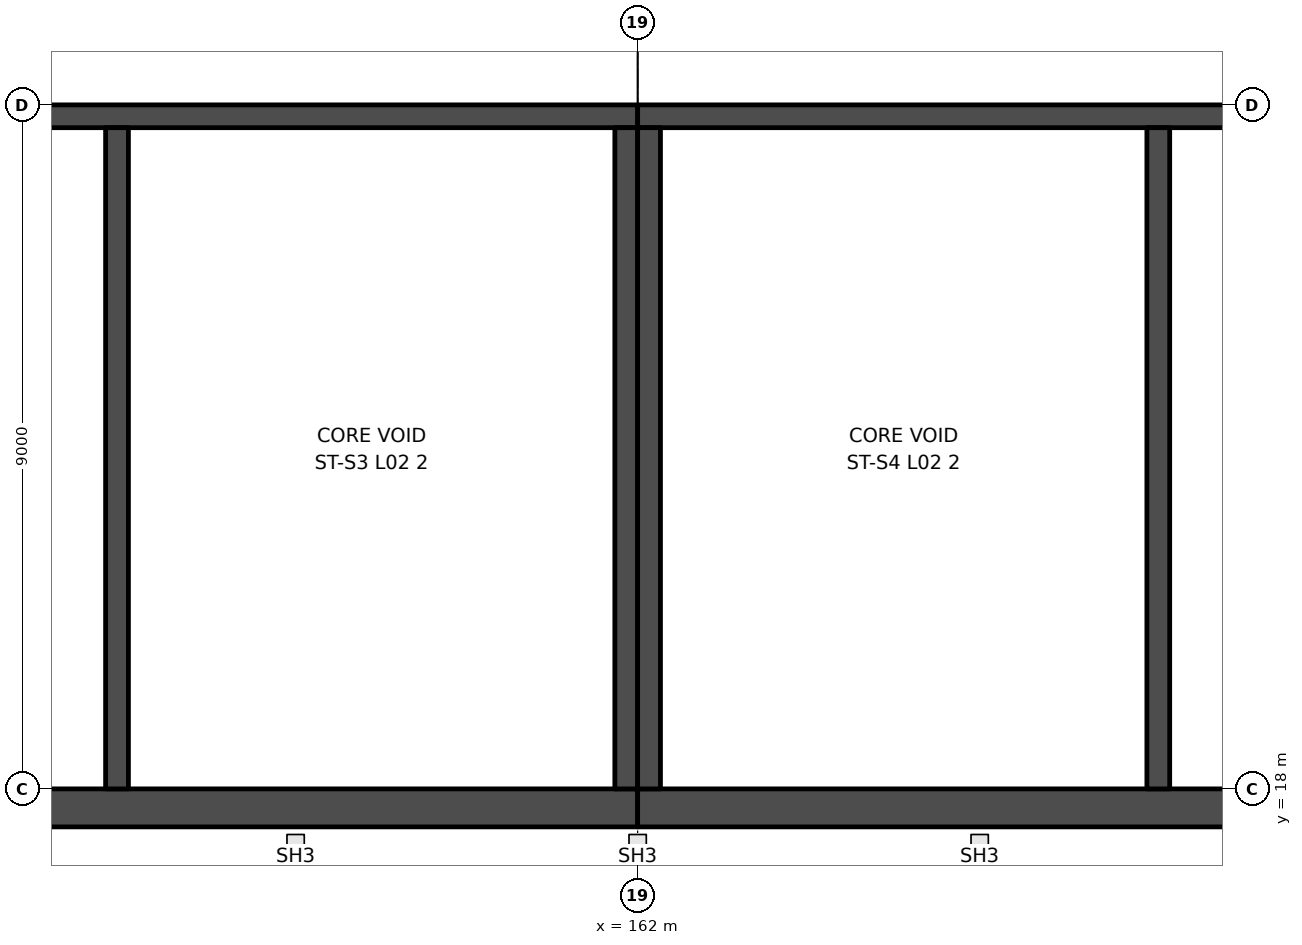
"""IFC4 building model, lengths in metres.
Left out: names, types, materials, properties, quantities, classifications, styles, units other than length and angle.
Written with IfcOpenShell. Run it as: python <this file> out.ifc"""

import sys

from ifc_helpers import new_model, si_unit, direction, frame, frame_2d, origin, place, context, subcontext, project, spatial, rectangle, extrude, element, save


model = new_model("IFC4")
c1 = context("Model", 3, precision=1e-05, world=origin(), true_north=direction((0.0, 1.0)))
c2 = subcontext(c1, "Body", "Model", "MODEL_VIEW")
j1 = project(units=[si_unit("LENGTHUNIT", "METRE"), si_unit("PLANEANGLEUNIT", "RADIAN")], contexts=[c1])
p1 = place(None, origin())
s1 = spatial("IfcSite", under=j1, at=p1, CompositionType="ELEMENT")
p2 = place(p1, origin())
s2 = spatial("IfcBuilding", under=s1, at=p2, CompositionType="ELEMENT")
p3 = place(p2, frame((0.0, 0.0, 11.5)))
s3 = spatial("IfcBuildingStorey", under=s2, at=p3, CompositionType="ELEMENT", Elevation=11.5)
p4 = place(p3, frame((144.0, 26.85, 0.0), z_axis=(0.0, 0.0, 1.0), x_axis=(1.0, 0.0, 0.0)))
e1 = element("IfcWall", 1, at=p4, inside=s3, PredefinedType="SHEAR", context=c2, shape_type="SweptSolid", body=[
    extrude(rectangle(XDim=18.0, YDim=0.3, at=frame_2d((9.0, 0.0))), origin(), (0.0, 0.0, 1.0), 10.5),
])
p5 = place(p4, frame((1.5, 0.0, 0.0)))
e2 = element("IfcOpeningElement", 2, at=p5, cuts=e1, PredefinedType="OPENING", context=c2, shape_type="SweptSolid", body=[
    extrude(rectangle(XDim=1.2, YDim=2.1, at=frame_2d((0.6, 1.05))), frame((0.0, 0.16, 0.0), z_axis=(0.0, -1.0, 0.0), x_axis=(1.0, 0.0, 0.0)), (0.0, 0.0, 1.0), 0.32),
])
p6 = place(p3, frame((144.0, 17.75, 0.0), z_axis=(0.0, 0.0, 1.0), x_axis=(1.0, 0.0, 0.0)))
e3 = element("IfcWall", 3, at=p6, inside=s3, PredefinedType="SHEAR", context=c2, shape_type="SweptSolid", body=[
    extrude(rectangle(XDim=18.0, YDim=0.5, at=frame_2d((9.0, 0.0))), origin(), (0.0, 0.0, 1.0), 10.5),
])
for number, where, z_axis, x_axis in (
    (4, (161.85, 26.7, 0.0), (0.0, 0.0, 1.0), (0.0, -1.0, 0.0)),
    (5, (155.15, 26.7, 0.0), (0.0, 0.0, 1.0), (0.0, -1.0, 0.0)),
):
    element("IfcWall", number, at=place(p3, frame(where, z_axis=z_axis, x_axis=x_axis)), inside=s3, PredefinedType="SHEAR", context=c2, shape_type="SweptSolid", body=[
        extrude(rectangle(XDim=8.7, YDim=0.3, at=frame_2d((4.35, 0.0))), origin(), (0.0, 0.0, 1.0), 10.5),
    ])
p7 = place(p3, frame((180.0, 26.85, 0.0), z_axis=(0.0, 0.0, 1.0), x_axis=(-1.0, 0.0, 0.0)))
e6 = element("IfcWall", 6, at=p7, inside=s3, PredefinedType="SHEAR", context=c2, shape_type="SweptSolid", body=[
    extrude(rectangle(XDim=18.0, YDim=0.3, at=frame_2d((9.0, 0.0))), origin(), (0.0, 0.0, 1.0), 10.5),
])
p8 = place(p7, frame((8.6, 0.0, 0.0)))
e7 = element("IfcOpeningElement", 7, at=p8, cuts=e6, PredefinedType="OPENING", context=c2, shape_type="SweptSolid", body=[
    extrude(rectangle(XDim=1.2, YDim=2.1, at=frame_2d((0.6, 1.05))), frame((0.0, 0.16, 0.0), z_axis=(0.0, -1.0, 0.0), x_axis=(1.0, 0.0, 0.0)), (0.0, 0.0, 1.0), 0.32),
])
p9 = place(p3, frame((180.0, 17.75, 0.0), z_axis=(0.0, 0.0, 1.0), x_axis=(-1.0, 0.0, 0.0)))
e8 = element("IfcWall", 8, at=p9, inside=s3, PredefinedType="SHEAR", context=c2, shape_type="SweptSolid", body=[
    extrude(rectangle(XDim=18.0, YDim=0.5, at=frame_2d((9.0, 0.0))), origin(), (0.0, 0.0, 1.0), 10.5),
])
for number, where, z_axis, x_axis in (
    (9, (162.15, 26.7, 0.0), (0.0, 0.0, 1.0), (0.0, -1.0, 0.0)),
    (10, (168.85, 26.7, 0.0), (0.0, 0.0, 1.0), (0.0, -1.0, 0.0)),
):
    element("IfcWall", number, at=place(p3, frame(where, z_axis=z_axis, x_axis=x_axis)), inside=s3, PredefinedType="SHEAR", context=c2, shape_type="SweptSolid", body=[
        extrude(rectangle(XDim=8.7, YDim=0.3, at=frame_2d((4.35, 0.0))), origin(), (0.0, 0.0, 1.0), 10.5),
    ])
save(model, sys.argv[1])
